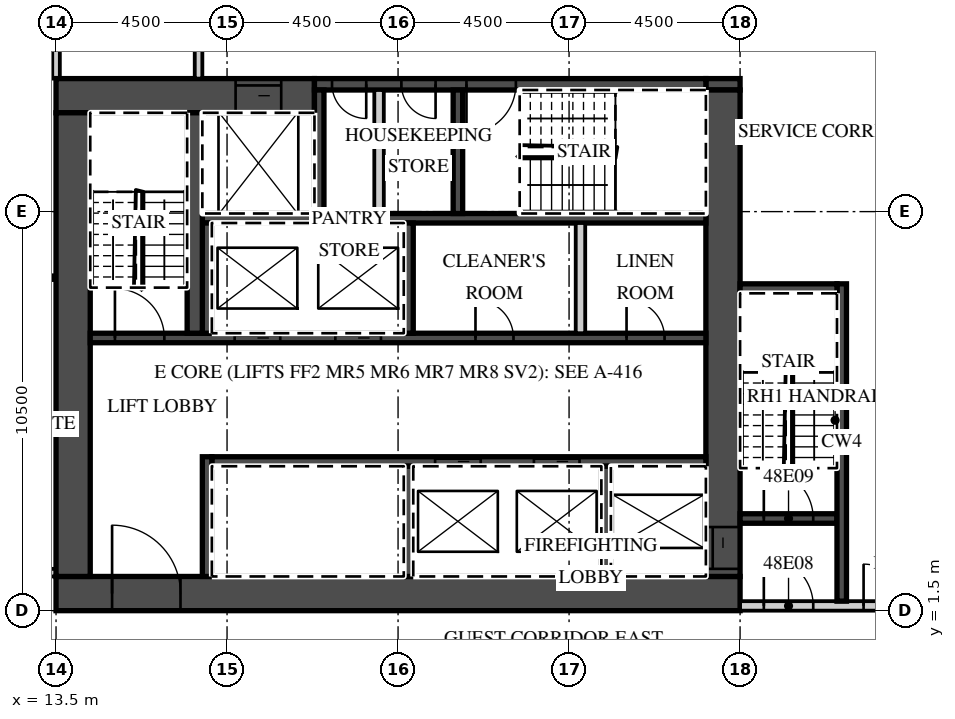
"""IFC4 building model, lengths in metres.
Left out: names, types, materials, properties, quantities, classifications, styles, units other than length and angle.
Written with IfcOpenShell. Run it as: python <this file> out.ifc"""

import sys

from ifc_helpers import new_model, si_unit, direction, frame, frame_2d, origin, place, context, subcontext, project, spatial, rectangle, extrude, element, fill, save


model = new_model("IFC4")
c1 = context("Model", 3, precision=1e-05, world=origin(), true_north=direction((0.0, 1.0)))
c2 = subcontext(c1, "Body", "Model", "MODEL_VIEW")
j1 = project(units=[si_unit("LENGTHUNIT", "METRE"), si_unit("PLANEANGLEUNIT", "RADIAN")], contexts=[c1])
p1 = place(None, origin())
s1 = spatial("IfcSite", under=j1, at=p1, CompositionType="ELEMENT")
p2 = place(p1, origin())
s2 = spatial("IfcBuilding", under=s1, at=p2, CompositionType="ELEMENT")
p3 = place(p2, frame((0.0, 0.0, 199.9)))
s3 = spatial("IfcBuildingStorey", under=s2, at=p3, CompositionType="ELEMENT", Elevation=199.9)
p4 = place(p3, frame((13.5, 15.5, 0.0), z_axis=(0.0, 0.0, 1.0), x_axis=(0.0, 1.0, 0.0)))
e1 = element("IfcWall", 1, at=p4, inside=s3, PredefinedType="PARTITIONING", context=c2, shape_type="SweptSolid", body=[
    extrude(rectangle(XDim=6.089, YDim=0.2, at=frame_2d((3.044, 0.0))), origin(), (0.0, 0.0, 1.0), 3.02),
])
p5 = place(p3, frame((-13.5, 2.5, 0.0), z_axis=(0.0, 0.0, 1.0), x_axis=(1.0, 0.0, 0.0)))
e2 = element("IfcWall", 2, at=p5, inside=s3, PredefinedType="PARTITIONING", context=c2, shape_type="SweptSolid", body=[
    extrude(rectangle(XDim=27.0, YDim=0.2, at=frame_2d((13.5, 0.0))), origin(), (0.0, 0.0, 1.0), 3.02),
])
p6 = place(p5, frame((2.925, 0.0, 0.0)))
e3 = element("IfcOpeningElement", 3, at=p6, cuts=e2, PredefinedType="OPENING", context=c2, shape_type="SweptSolid", body=[
    extrude(rectangle(XDim=1.0, YDim=2.1, at=frame_2d((0.5, 1.05))), frame((0.0, 0.11, 0.0), z_axis=(0.0, -1.0, 0.0), x_axis=(1.0, 0.0, 0.0)), (0.0, 0.0, 1.0), 0.22),
])
p7 = place(p5, frame((9.863, 0.0, 0.0)))
e4 = element("IfcOpeningElement", 4, at=p7, cuts=e2, PredefinedType="OPENING", context=c2, shape_type="SweptSolid", body=[
    extrude(rectangle(XDim=1.2, YDim=2.1, at=frame_2d((0.6, 1.05))), frame((0.0, 0.11, 0.0), z_axis=(0.0, -1.0, 0.0), x_axis=(1.0, 0.0, 0.0)), (0.0, 0.0, 1.0), 0.22),
])
p8 = place(p5, frame((15.938, 0.0, 0.0)))
e5 = element("IfcOpeningElement", 5, at=p8, cuts=e2, PredefinedType="OPENING", context=c2, shape_type="SweptSolid", body=[
    extrude(rectangle(XDim=1.2, YDim=2.1, at=frame_2d((0.6, 1.05))), frame((0.0, 0.11, 0.0), z_axis=(0.0, -1.0, 0.0), x_axis=(1.0, 0.0, 0.0)), (0.0, 0.0, 1.0), 0.22),
])
p9 = place(p5, frame((23.075, 0.0, 0.0)))
e6 = element("IfcOpeningElement", 6, at=p9, cuts=e2, PredefinedType="OPENING", context=c2, shape_type="SweptSolid", body=[
    extrude(rectangle(XDim=1.0, YDim=2.1, at=frame_2d((0.5, 1.05))), frame((0.0, 0.11, 0.0), z_axis=(0.0, -1.0, 0.0), x_axis=(1.0, 0.0, 0.0)), (0.0, 0.0, 1.0), 0.22),
])
p10 = place(p3, frame((13.5, 1.95, 0.0), z_axis=(0.0, 0.0, 1.0), x_axis=(1.0, 0.0, 0.0)))
e7 = element("IfcWall", 7, at=p10, inside=s3, PredefinedType="SHEAR", context=c2, shape_type="SweptSolid", body=[
    extrude(rectangle(XDim=18.0, YDim=0.9, at=frame_2d((9.0, 0.0))), origin(), (0.0, 0.0, 1.0), 3.02),
])
p11 = place(p10, frame((1.475, 0.0, 0.0)))
e8 = element("IfcOpeningElement", 8, at=p11, cuts=e7, PredefinedType="OPENING", context=c2, shape_type="SweptSolid", body=[
    extrude(rectangle(XDim=1.8, YDim=2.1, at=frame_2d((0.9, 1.05))), frame((0.0, 0.46, 0.0), z_axis=(0.0, -1.0, 0.0), x_axis=(1.0, 0.0, 0.0)), (0.0, 0.0, 1.0), 0.92),
])
p12 = place(p3, frame((13.5, 15.05, 0.0), z_axis=(0.0, 0.0, 1.0), x_axis=(1.0, 0.0, 0.0)))
e9 = element("IfcWall", 9, at=p12, inside=s3, PredefinedType="SHEAR", context=c2, shape_type="SweptSolid", body=[
    extrude(rectangle(XDim=6.8, YDim=0.9, at=frame_2d((3.4, 0.0))), origin(), (0.0, 0.0, 1.0), 3.02),
])
p13 = place(p12, frame((4.725, 0.0, 0.0)))
e10 = element("IfcOpeningElement", 10, at=p13, cuts=e9, PredefinedType="OPENING", context=c2, shape_type="SweptSolid", body=[
    extrude(rectangle(XDim=1.2, YDim=2.1, at=frame_2d((0.6, 1.05))), frame((0.0, 0.46, 0.0), z_axis=(0.0, -1.0, 0.0), x_axis=(1.0, 0.0, 0.0)), (0.0, 0.0, 1.0), 0.92),
])
p14 = place(p3, frame((30.6, 15.35, 0.0), z_axis=(0.0, 0.0, 1.0), x_axis=(1.0, 0.0, 0.0)))
e11 = element("IfcWall", 11, at=p14, inside=s3, PredefinedType="SHEAR", context=c2, shape_type="SweptSolid", body=[
    extrude(rectangle(XDim=0.9, YDim=0.3, at=frame_2d((0.45, 0.0))), origin(), (0.0, 0.0, 1.0), 3.02),
])
p15 = place(p3, frame((20.3, 15.35, 0.0), z_axis=(0.0, 0.0, 1.0), x_axis=(1.0, 0.0, 0.0)))
e12 = element("IfcWall", 12, at=p15, inside=s3, PredefinedType="SHEAR", context=c2, shape_type="SweptSolid", body=[
    extrude(rectangle(XDim=10.3, YDim=0.3, at=frame_2d((5.15, 0.0))), origin(), (0.0, 0.0, 1.0), 3.02),
])
p16 = place(p15, frame((4.0, 0.0, 0.0)))
e13 = element("IfcOpeningElement", 13, at=p16, cuts=e12, PredefinedType="OPENING", context=c2, shape_type="SweptSolid", body=[
    extrude(rectangle(XDim=1.3, YDim=2.1, at=frame_2d((0.65, 1.05))), frame((0.0, 0.16, 0.0), z_axis=(0.0, -1.0, 0.0), x_axis=(1.0, 0.0, 0.0)), (0.0, 0.0, 1.0), 0.32),
])
p17 = place(p15, frame((2.288, 0.0, 0.0)))
e14 = element("IfcOpeningElement", 14, at=p17, cuts=e12, PredefinedType="OPENING", context=c2, shape_type="SweptSolid", body=[
    extrude(rectangle(XDim=0.9, YDim=2.1, at=frame_2d((0.45, 1.05))), frame((0.0, 0.16, 0.0), z_axis=(0.0, -1.0, 0.0), x_axis=(1.0, 0.0, 0.0)), (0.0, 0.0, 1.0), 0.32),
])
p18 = place(p15, frame((0.462, 0.0, 0.0)))
e15 = element("IfcOpeningElement", 15, at=p18, cuts=e12, PredefinedType="OPENING", context=c2, shape_type="SweptSolid", body=[
    extrude(rectangle(XDim=0.9, YDim=2.1, at=frame_2d((0.45, 1.05))), frame((0.0, 0.16, 0.0), z_axis=(0.0, -1.0, 0.0), x_axis=(1.0, 0.0, 0.0)), (0.0, 0.0, 1.0), 0.32),
])
p19 = place(p3, frame((31.05, 2.4, 0.0), z_axis=(0.0, 0.0, 1.0), x_axis=(0.0, 1.0, 0.0)))
e16 = element("IfcWall", 16, at=p19, inside=s3, PredefinedType="SHEAR", context=c2, shape_type="SweptSolid", body=[
    extrude(rectangle(XDim=12.8, YDim=0.9, at=frame_2d((6.4, 0.0))), origin(), (0.0, 0.0, 1.0), 3.02),
])
p20 = place(p19, frame((0.2, 0.0, 0.0)))
e17 = element("IfcOpeningElement", 17, at=p20, cuts=e16, PredefinedType="OPENING", context=c2, shape_type="SweptSolid", body=[
    extrude(rectangle(XDim=1.1, YDim=2.1, at=frame_2d((0.55, 1.05))), frame((0.0, 0.46, 0.0), z_axis=(0.0, -1.0, 0.0), x_axis=(1.0, 0.0, 0.0)), (0.0, 0.0, 1.0), 0.92),
])
p21 = place(p3, frame((13.95, 2.4, 0.0), z_axis=(0.0, 0.0, 1.0), x_axis=(0.0, 1.0, 0.0)))
e18 = element("IfcWall", 18, at=p21, inside=s3, PredefinedType="SHEAR", context=c2, shape_type="SweptSolid", body=[
    extrude(rectangle(XDim=12.2, YDim=0.9, at=frame_2d((6.1, 0.0))), origin(), (0.0, 0.0, 1.0), 3.02),
])
p22 = place(p3, frame((17.6, 5.425, 0.0), z_axis=(0.0, 0.0, 1.0), x_axis=(1.0, 0.0, 0.0)))
e19 = element("IfcWall", 19, at=p22, inside=s3, PredefinedType="SHEAR", context=c2, shape_type="SweptSolid", body=[
    extrude(rectangle(XDim=13.0, YDim=0.25, at=frame_2d((6.5, 0.0))), origin(), (0.0, 0.0, 1.0), 3.02),
])
p23 = place(p22, frame((8.475, 0.0, 0.0)))
e20 = element("IfcOpeningElement", 20, at=p23, cuts=e19, PredefinedType="OPENING", context=c2, shape_type="SweptSolid", body=[
    extrude(rectangle(XDim=1.2, YDim=2.1, at=frame_2d((0.6, 1.05))), frame((0.0, 0.135, 0.0), z_axis=(0.0, -1.0, 0.0), x_axis=(1.0, 0.0, 0.0)), (0.0, 0.0, 1.0), 0.27),
])
p24 = place(p22, frame((5.875, 0.0, 0.0)))
e21 = element("IfcOpeningElement", 21, at=p24, cuts=e19, PredefinedType="OPENING", context=c2, shape_type="SweptSolid", body=[
    extrude(rectangle(XDim=1.2, YDim=2.1, at=frame_2d((0.6, 1.05))), frame((0.0, 0.135, 0.0), z_axis=(0.0, -1.0, 0.0), x_axis=(1.0, 0.0, 0.0)), (0.0, 0.0, 1.0), 0.27),
])
p25 = place(p3, frame((17.475, 2.4, 0.0), z_axis=(0.0, 0.0, 1.0), x_axis=(0.0, 1.0, 0.0)))
e22 = element("IfcWall", 22, at=p25, inside=s3, PredefinedType="SHEAR", context=c2, shape_type="SweptSolid", body=[
    extrude(rectangle(XDim=3.15, YDim=0.25, at=frame_2d((1.575, 0.0))), origin(), (0.0, 0.0, 1.0), 3.02),
])
for number, where, z_axis, x_axis in (
    (23, (27.975, 2.4, 0.0), (0.0, 0.0, 1.0), (0.0, 1.0, 0.0)),
    (24, (22.775, 2.4, 0.0), (0.0, 0.0, 1.0), (0.0, 1.0, 0.0)),
):
    element("IfcWall", number, at=place(p3, frame(where, z_axis=z_axis, x_axis=x_axis)), inside=s3, PredefinedType="SHEAR", context=c2, shape_type="SweptSolid", body=[
        extrude(rectangle(XDim=2.9, YDim=0.25, at=frame_2d((1.45, 0.0))), origin(), (0.0, 0.0, 1.0), 3.02),
    ])
p26 = place(p3, frame((14.4, 8.675, 0.0), z_axis=(0.0, 0.0, 1.0), x_axis=(1.0, 0.0, 0.0)))
e25 = element("IfcWall", 25, at=p26, inside=s3, PredefinedType="SHEAR", context=c2, shape_type="SweptSolid", body=[
    extrude(rectangle(XDim=16.2, YDim=0.25, at=frame_2d((8.1, 0.0))), origin(), (0.0, 0.0, 1.0), 3.02),
])
p27 = place(p26, frame((6.45, 0.0, 0.0)))
e26 = element("IfcOpeningElement", 26, at=p27, cuts=e25, PredefinedType="OPENING", context=c2, shape_type="SweptSolid", body=[
    extrude(rectangle(XDim=1.2, YDim=2.1, at=frame_2d((0.6, 1.05))), frame((0.0, 0.135, 0.0), z_axis=(0.0, -1.0, 0.0), x_axis=(1.0, 0.0, 0.0)), (0.0, 0.0, 1.0), 0.27),
])
p28 = place(p26, frame((3.8, 0.0, 0.0)))
e27 = element("IfcOpeningElement", 27, at=p28, cuts=e25, PredefinedType="OPENING", context=c2, shape_type="SweptSolid", body=[
    extrude(rectangle(XDim=1.2, YDim=2.1, at=frame_2d((0.6, 1.05))), frame((0.0, 0.135, 0.0), z_axis=(0.0, -1.0, 0.0), x_axis=(1.0, 0.0, 0.0)), (0.0, 0.0, 1.0), 0.27),
])
p29 = place(p26, frame((0.65, 0.0, 0.0)))
e28 = element("IfcOpeningElement", 28, at=p29, cuts=e25, PredefinedType="OPENING", context=c2, shape_type="SweptSolid", body=[
    extrude(rectangle(XDim=1.3, YDim=2.1, at=frame_2d((0.65, 1.05))), frame((0.0, 0.135, 0.0), z_axis=(0.0, -1.0, 0.0), x_axis=(1.0, 0.0, 0.0)), (0.0, 0.0, 1.0), 0.27),
])
p30 = place(p26, frame((14.113, 0.0, 0.0)))
e29 = element("IfcOpeningElement", 29, at=p30, cuts=e25, PredefinedType="OPENING", context=c2, shape_type="SweptSolid", body=[
    extrude(rectangle(XDim=1.0, YDim=2.1, at=frame_2d((0.5, 1.05))), frame((0.0, 0.135, 0.0), z_axis=(0.0, -1.0, 0.0), x_axis=(1.0, 0.0, 0.0)), (0.0, 0.0, 1.0), 0.27),
])
p31 = place(p26, frame((10.137, 0.0, 0.0)))
e30 = element("IfcOpeningElement", 30, at=p31, cuts=e25, PredefinedType="OPENING", context=c2, shape_type="SweptSolid", body=[
    extrude(rectangle(XDim=1.0, YDim=2.1, at=frame_2d((0.5, 1.05))), frame((0.0, 0.135, 0.0), z_axis=(0.0, -1.0, 0.0), x_axis=(1.0, 0.0, 0.0)), (0.0, 0.0, 1.0), 0.27),
])
p32 = place(p3, frame((17.35, 11.825, 0.0), z_axis=(0.0, 0.0, 1.0), x_axis=(1.0, 0.0, 0.0)))
e31 = element("IfcWall", 31, at=p32, inside=s3, PredefinedType="SHEAR", context=c2, shape_type="SweptSolid", body=[
    extrude(rectangle(XDim=13.25, YDim=0.25, at=frame_2d((6.625, 0.0))), origin(), (0.0, 0.0, 1.0), 3.02),
])
for number, where, z_axis, x_axis in (
    (32, (17.475, 8.8, 0.0), (0.0, 0.0, 1.0), (0.0, 1.0, 0.0)),
    (33, (22.775, 8.8, 0.0), (0.0, 0.0, 1.0), (0.0, 1.0, 0.0)),
):
    element("IfcWall", number, at=place(p3, frame(where, z_axis=z_axis, x_axis=x_axis)), inside=s3, PredefinedType="SHEAR", context=c2, shape_type="SweptSolid", body=[
        extrude(rectangle(XDim=2.9, YDim=0.25, at=frame_2d((1.45, 0.0))), origin(), (0.0, 0.0, 1.0), 3.02),
    ])
p33 = place(p3, frame((27.3, 8.8, 0.0), z_axis=(0.0, 0.0, 1.0), x_axis=(0.0, 1.0, 0.0)))
e34 = element("IfcWall", 34, at=p33, inside=s3, PredefinedType="PARTITIONING", context=c2, shape_type="SweptSolid", body=[
    extrude(rectangle(XDim=2.9, YDim=0.25, at=frame_2d((1.45, 0.0))), origin(), (0.0, 0.0, 1.0), 3.02),
])
p34 = place(p3, frame((17.15, 8.8, 0.0), z_axis=(0.0, 0.0, 1.0), x_axis=(0.0, 1.0, 0.0)))
e35 = element("IfcWall", 35, at=p34, inside=s3, PredefinedType="SHEAR", context=c2, shape_type="SweptSolid", body=[
    extrude(rectangle(XDim=5.8, YDim=0.4, at=frame_2d((2.9, 0.0))), origin(), (0.0, 0.0, 1.0), 3.02),
])
for number, where, z_axis, x_axis in (
    (36, (20.425, 11.95, 0.0), (0.0, 0.0, 1.0), (0.0, 1.0, 0.0)),
    (37, (24.075, 11.95, 0.0), (0.0, 0.0, 1.0), (0.0, 1.0, 0.0)),
):
    element("IfcWall", number, at=place(p3, frame(where, z_axis=z_axis, x_axis=x_axis)), inside=s3, PredefinedType="SHEAR", context=c2, shape_type="SweptSolid", body=[
        extrude(rectangle(XDim=3.25, YDim=0.25, at=frame_2d((1.625, 0.0))), origin(), (0.0, 0.0, 1.0), 3.02),
    ])
p35 = place(p3, frame((22.0, 11.95, 0.0), z_axis=(0.0, 0.0, 1.0), x_axis=(0.0, 1.0, 0.0)))
e38 = element("IfcWall", 38, at=p35, inside=s3, PredefinedType="PARTITIONING", context=c2, shape_type="SweptSolid", body=[
    extrude(rectangle(XDim=3.25, YDim=0.25, at=frame_2d((1.625, 0.0))), origin(), (0.0, 0.0, 1.0), 3.02),
])
p36 = place(p3, frame((31.5, 1.625, 0.0), z_axis=(0.0, 0.0, 1.0), x_axis=(1.0, 0.0, 0.0)))
e39 = element("IfcWall", 39, at=p36, inside=s3, PredefinedType="PARTITIONING", context=c2, shape_type="SweptSolid", body=[
    extrude(rectangle(XDim=8.035, YDim=0.25, at=frame_2d((4.018, 0.0))), origin(), (0.0, 0.0, 1.0), 3.02),
])
p37 = place(p36, frame((0.625, 0.0, 0.0)))
e40 = element("IfcOpeningElement", 40, at=p37, cuts=e39, PredefinedType="OPENING", context=c2, shape_type="SweptSolid", body=[
    extrude(rectangle(XDim=1.3, YDim=2.1, at=frame_2d((0.65, 1.05))), frame((0.0, 0.135, 0.0), z_axis=(0.0, -1.0, 0.0), x_axis=(1.0, 0.0, 0.0)), (0.0, 0.0, 1.0), 0.27),
])
p38 = place(p36, frame((3.25, 0.0, 0.0)))
e41 = element("IfcOpeningElement", 41, at=p38, cuts=e39, PredefinedType="OPENING", context=c2, shape_type="SweptSolid", body=[
    extrude(rectangle(XDim=1.1, YDim=2.1, at=frame_2d((0.55, 1.05))), frame((0.0, 0.135, 0.0), z_axis=(0.0, -1.0, 0.0), x_axis=(1.0, 0.0, 0.0)), (0.0, 0.0, 1.0), 0.27),
])
p39 = place(p3, frame((31.5, 3.925, 0.0), z_axis=(0.0, 0.0, 1.0), x_axis=(1.0, 0.0, 0.0)))
e42 = element("IfcWall", 42, at=p39, inside=s3, PredefinedType="SHEAR", context=c2, shape_type="SweptSolid", body=[
    extrude(rectangle(XDim=2.55, YDim=0.25, at=frame_2d((1.275, 0.0))), origin(), (0.0, 0.0, 1.0), 3.02),
])
p40 = place(p39, frame((0.625, 0.0, 0.0)))
e43 = element("IfcOpeningElement", 43, at=p40, cuts=e42, PredefinedType="OPENING", context=c2, shape_type="SweptSolid", body=[
    extrude(rectangle(XDim=1.3, YDim=2.1, at=frame_2d((0.65, 1.05))), frame((0.0, 0.135, 0.0), z_axis=(0.0, -1.0, 0.0), x_axis=(1.0, 0.0, 0.0)), (0.0, 0.0, 1.0), 0.27),
])
p41 = place(p3, frame((34.175, 1.75, 0.0), z_axis=(0.0, 0.0, 1.0), x_axis=(0.0, 1.0, 0.0)))
e44 = element("IfcWall", 44, at=p41, inside=s3, PredefinedType="SHEAR", context=c2, shape_type="SweptSolid", body=[
    extrude(rectangle(XDim=8.35, YDim=0.25, at=frame_2d((4.175, 0.0))), origin(), (0.0, 0.0, 1.0), 3.02),
])
p42 = place(p3, frame((31.5, 9.975, 0.0), z_axis=(0.0, 0.0, 1.0), x_axis=(1.0, 0.0, 0.0)))
e45 = element("IfcWall", 45, at=p42, inside=s3, PredefinedType="SHEAR", context=c2, shape_type="SweptSolid", body=[
    extrude(rectangle(XDim=2.55, YDim=0.25, at=frame_2d((1.275, 0.0))), origin(), (0.0, 0.0, 1.0), 3.02),
])
p43 = place(p3, frame((17.25, 15.5, 0.0), z_axis=(0.0, 0.0, 1.0), x_axis=(0.0, 1.0, 0.0)))
e46 = element("IfcWall", 46, at=p43, inside=s3, PredefinedType="PARTITIONING", context=c2, shape_type="SweptSolid", body=[
    extrude(rectangle(XDim=2.2, YDim=0.2, at=frame_2d((1.1, 0.0))), origin(), (0.0, 0.0, 1.0), 3.02),
])
p44 = place(p27, origin())
e47 = element("IfcDoor", 47, at=p44, inside=s3, OperationType="SLIDING_TO_LEFT", PredefinedType="DOOR", context=c2, shape_type="SweptSolid", body=[
    extrude(rectangle(XDim=1.2, YDim=2.1, at=frame_2d((0.6, 1.05))), frame((0.0, 0.025, 0.0), z_axis=(0.0, -1.0, 0.0), x_axis=(1.0, 0.0, 0.0)), (0.0, 0.0, 1.0), 0.05),
])
fill(e26, e47)
p45 = place(p28, origin())
e48 = element("IfcDoor", 48, at=p45, inside=s3, OperationType="SLIDING_TO_RIGHT", PredefinedType="DOOR", context=c2, shape_type="SweptSolid", body=[
    extrude(rectangle(XDim=1.2, YDim=2.1, at=frame_2d((0.6, 1.05))), frame((0.0, 0.025, 0.0), z_axis=(0.0, -1.0, 0.0), x_axis=(1.0, 0.0, 0.0)), (0.0, 0.0, 1.0), 0.05),
])
fill(e27, e48)
p46 = place(p23, origin())
e49 = element("IfcDoor", 49, at=p46, inside=s3, OperationType="SLIDING_TO_LEFT", PredefinedType="DOOR", context=c2, shape_type="SweptSolid", body=[
    extrude(rectangle(XDim=1.2, YDim=2.1, at=frame_2d((0.6, 1.05))), frame((0.0, 0.025, 0.0), z_axis=(0.0, -1.0, 0.0), x_axis=(1.0, 0.0, 0.0)), (0.0, 0.0, 1.0), 0.05),
])
fill(e20, e49)
p47 = place(p24, origin())
e50 = element("IfcDoor", 50, at=p47, inside=s3, OperationType="SLIDING_TO_RIGHT", PredefinedType="DOOR", context=c2, shape_type="SweptSolid", body=[
    extrude(rectangle(XDim=1.2, YDim=2.1, at=frame_2d((0.6, 1.05))), frame((0.0, 0.025, 0.0), z_axis=(0.0, -1.0, 0.0), x_axis=(1.0, 0.0, 0.0)), (0.0, 0.0, 1.0), 0.05),
])
fill(e21, e50)
p48 = place(p13, origin())
e51 = element("IfcDoor", 51, at=p48, inside=s3, OperationType="SLIDING_TO_LEFT", PredefinedType="DOOR", context=c2, shape_type="SweptSolid", body=[
    extrude(rectangle(XDim=1.2, YDim=2.1, at=frame_2d((0.6, 1.05))), frame((0.0, 0.025, 0.0), z_axis=(0.0, -1.0, 0.0), x_axis=(1.0, 0.0, 0.0)), (0.0, 0.0, 1.0), 0.05),
])
fill(e10, e51)
p49 = place(p20, origin())
e52 = element("IfcDoor", 52, at=p49, inside=s3, OperationType="SLIDING_TO_LEFT", PredefinedType="DOOR", context=c2, shape_type="SweptSolid", body=[
    extrude(rectangle(XDim=1.1, YDim=2.1, at=frame_2d((0.55, 1.05))), frame((0.0, 0.025, 0.0), z_axis=(0.0, -1.0, 0.0), x_axis=(1.0, 0.0, 0.0)), (0.0, 0.0, 1.0), 0.05),
])
fill(e17, e52)
p50 = place(p11, origin())
e53 = element("IfcDoor", 53, at=p50, inside=s3, OperationType="DOUBLE_DOOR_DOUBLE_SWING", PredefinedType="DOOR", context=c2, shape_type="SweptSolid", body=[
    extrude(rectangle(XDim=1.8, YDim=2.1, at=frame_2d((0.9, 1.05))), frame((0.0, 0.025, 0.0), z_axis=(0.0, -1.0, 0.0), x_axis=(1.0, 0.0, 0.0)), (0.0, 0.0, 1.0), 0.05),
])
fill(e8, e53)
p51 = place(p37, origin())
e54 = element("IfcDoor", 54, at=p51, inside=s3, OperationType="SINGLE_SWING_LEFT", PredefinedType="DOOR", context=c2, shape_type="SweptSolid", body=[
    extrude(rectangle(XDim=1.3, YDim=2.1, at=frame_2d((0.65, 1.05))), frame((0.0, 0.025, 0.0), z_axis=(0.0, -1.0, 0.0), x_axis=(1.0, 0.0, 0.0)), (0.0, 0.0, 1.0), 0.05),
])
fill(e40, e54)
p52 = place(p40, origin())
e55 = element("IfcDoor", 55, at=p52, inside=s3, OperationType="SINGLE_SWING_LEFT", PredefinedType="DOOR", context=c2, shape_type="SweptSolid", body=[
    extrude(rectangle(XDim=1.3, YDim=2.1, at=frame_2d((0.65, 1.05))), frame((0.0, 0.025, 0.0), z_axis=(0.0, -1.0, 0.0), x_axis=(1.0, 0.0, 0.0)), (0.0, 0.0, 1.0), 0.05),
])
fill(e43, e55)
p53 = place(p38, origin())
e56 = element("IfcDoor", 56, at=p53, inside=s3, OperationType="SINGLE_SWING_LEFT", PredefinedType="DOOR", context=c2, shape_type="SweptSolid", body=[
    extrude(rectangle(XDim=1.1, YDim=2.1, at=frame_2d((0.55, 1.05))), frame((0.0, 0.025, 0.0), z_axis=(0.0, -1.0, 0.0), x_axis=(1.0, 0.0, 0.0)), (0.0, 0.0, 1.0), 0.05),
])
fill(e41, e56)
p54 = place(p29, origin())
e57 = element("IfcDoor", 57, at=p54, inside=s3, OperationType="SINGLE_SWING_LEFT", PredefinedType="DOOR", context=c2, shape_type="SweptSolid", body=[
    extrude(rectangle(XDim=1.3, YDim=2.1, at=frame_2d((0.65, 1.05))), frame((0.0, 0.025, 0.0), z_axis=(0.0, -1.0, 0.0), x_axis=(1.0, 0.0, 0.0)), (0.0, 0.0, 1.0), 0.05),
])
fill(e28, e57)
p55 = place(p16, origin())
e58 = element("IfcDoor", 58, at=p55, inside=s3, OperationType="SINGLE_SWING_LEFT", PredefinedType="DOOR", context=c2, shape_type="SweptSolid", body=[
    extrude(rectangle(XDim=1.3, YDim=2.1, at=frame_2d((0.65, 1.05))), frame((0.0, 0.025, 0.0), z_axis=(0.0, -1.0, 0.0), x_axis=(1.0, 0.0, 0.0)), (0.0, 0.0, 1.0), 0.05),
])
fill(e13, e58)
p56 = place(p17, origin())
e59 = element("IfcDoor", 59, at=p56, inside=s3, OperationType="SINGLE_SWING_RIGHT", PredefinedType="DOOR", context=c2, shape_type="SweptSolid", body=[
    extrude(rectangle(XDim=0.9, YDim=2.1, at=frame_2d((0.45, 1.05))), frame((0.0, 0.025, 0.0), z_axis=(0.0, -1.0, 0.0), x_axis=(1.0, 0.0, 0.0)), (0.0, 0.0, 1.0), 0.05),
])
fill(e14, e59)
p57 = place(p18, origin())
e60 = element("IfcDoor", 60, at=p57, inside=s3, OperationType="SINGLE_SWING_RIGHT", PredefinedType="DOOR", context=c2, shape_type="SweptSolid", body=[
    extrude(rectangle(XDim=0.9, YDim=2.1, at=frame_2d((0.45, 1.05))), frame((0.0, 0.025, 0.0), z_axis=(0.0, -1.0, 0.0), x_axis=(1.0, 0.0, 0.0)), (0.0, 0.0, 1.0), 0.05),
])
fill(e15, e60)
p58 = place(p30, origin())
e61 = element("IfcDoor", 61, at=p58, inside=s3, OperationType="SINGLE_SWING_LEFT", PredefinedType="DOOR", context=c2, shape_type="SweptSolid", body=[
    extrude(rectangle(XDim=1.0, YDim=2.1, at=frame_2d((0.5, 1.05))), frame((0.0, 0.025, 0.0), z_axis=(0.0, -1.0, 0.0), x_axis=(1.0, 0.0, 0.0)), (0.0, 0.0, 1.0), 0.05),
])
fill(e29, e61)
p59 = place(p31, origin())
e62 = element("IfcDoor", 62, at=p59, inside=s3, OperationType="SINGLE_SWING_LEFT", PredefinedType="DOOR", context=c2, shape_type="SweptSolid", body=[
    extrude(rectangle(XDim=1.0, YDim=2.1, at=frame_2d((0.5, 1.05))), frame((0.0, 0.025, 0.0), z_axis=(0.0, -1.0, 0.0), x_axis=(1.0, 0.0, 0.0)), (0.0, 0.0, 1.0), 0.05),
])
fill(e30, e62)
save(model, sys.argv[1])
